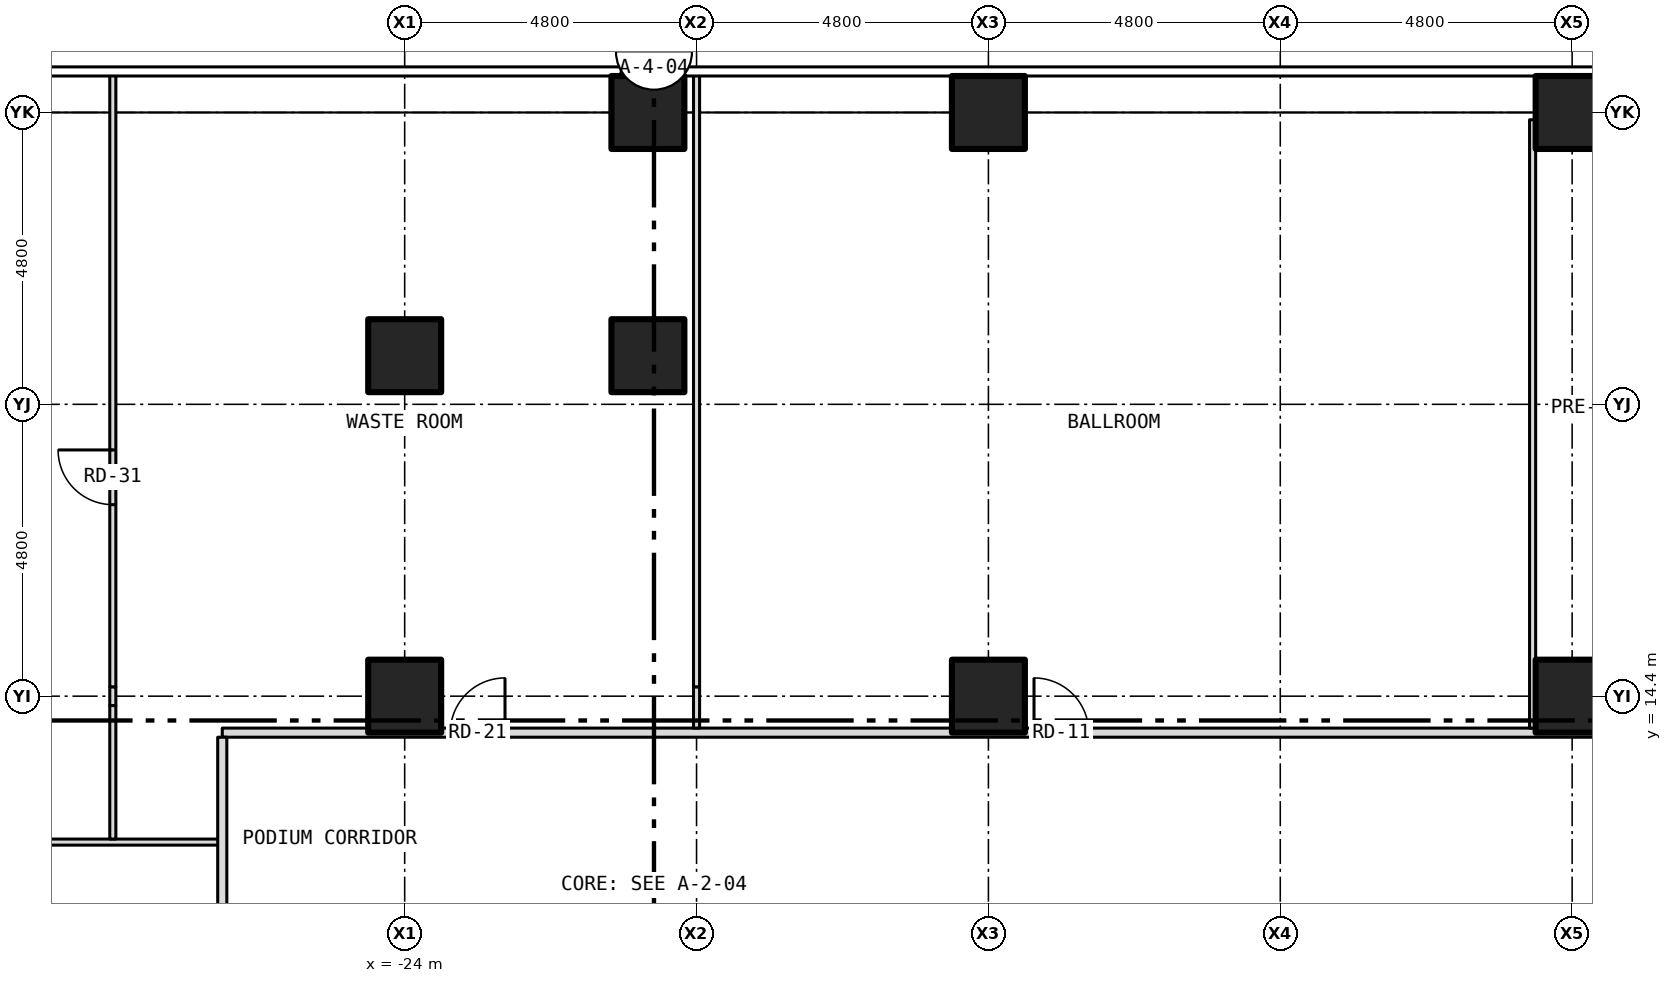
"""IFC4 building model, lengths in metres.
Left out: names, types, materials, properties, quantities, classifications, styles, units other than length and angle.
Written with IfcOpenShell. Run it as: python <this file> out.ifc"""

import sys

from ifc_helpers import new_model, si_unit, direction, frame, frame_2d, origin, origin_2d, place, context, subcontext, project, spatial, rectangle, hollow_rectangle, extrude, element, fill, save


model = new_model("IFC4")
c1 = context("Model", 3, precision=1e-05, world=origin(), true_north=direction((0.0, 1.0)))
c2 = subcontext(c1, "Body", "Model", "MODEL_VIEW")
j1 = project(units=[si_unit("LENGTHUNIT", "METRE"), si_unit("PLANEANGLEUNIT", "RADIAN")], contexts=[c1])
p1 = place(None, origin())
s1 = spatial("IfcSite", under=j1, at=p1, CompositionType="ELEMENT")
p2 = place(p1, origin())
s2 = spatial("IfcBuilding", under=s1, at=p2, CompositionType="ELEMENT")
p3 = place(p2, frame((0.0, 0.0, 7.5)))
s3 = spatial("IfcBuildingStorey", under=s2, at=p3, CompositionType="ELEMENT", Elevation=7.5)
for number, where, z_axis, x_axis in (
    (1, (-20.0, 24.0, -0.25), (0.0, 0.0, 1.0), (1.0, 0.0, 0.0)),
    (2, (-14.4, 24.0, -0.25), (0.0, 0.0, 1.0), (1.0, 0.0, 0.0)),
    (3, (-4.8, 24.0, -0.25), (0.0, 0.0, 1.0), (1.0, 0.0, 0.0)),
    (4, (-24.0, 14.4, -0.25), (0.0, 0.0, 1.0), (1.0, 0.0, 0.0)),
    (5, (-24.0, 20.0, -0.25), (0.0, 0.0, 1.0), (1.0, 0.0, 0.0)),
    (6, (-20.0, 20.0, -0.25), (0.0, 0.0, 1.0), (1.0, 0.0, 0.0)),
    (7, (-14.4, 14.4, -0.25), (0.0, 0.0, 1.0), (1.0, 0.0, 0.0)),
    (8, (-4.8, 14.4, -0.25), (0.0, 0.0, 1.0), (1.0, 0.0, 0.0)),
):
    element("IfcColumn", number, at=place(p3, frame(where, z_axis=z_axis, x_axis=x_axis)), inside=s3, PredefinedType="COLUMN", context=c2, shape_type="SweptSolid", body=[
        extrude(hollow_rectangle(XDim=1.2, YDim=1.2, WallThickness=0.07, at=origin_2d()), origin(), (0.0, 0.0, 1.0), 8.05),
    ])
p4 = place(p3, frame((-38.28, 12.0, 0.0), z_axis=(0.0, 0.0, 1.0), x_axis=(1.0, 0.0, 0.0)))
e9 = element("IfcWall", 9, at=p4, inside=s3, PredefinedType="PARTITIONING", context=c2, shape_type="SweptSolid", body=[
    extrude(rectangle(XDim=11.28, YDim=0.1, at=frame_2d((5.64, 0.0))), origin(), (0.0, 0.0, 1.0), 7.8),
])
p5 = place(p3, frame((-27.0, 13.8, 0.0), z_axis=(0.0, 0.0, 1.0), x_axis=(1.0, 0.0, 0.0)))
e10 = element("IfcWall", 10, at=p5, inside=s3, PredefinedType="PARTITIONING", context=c2, shape_type="SweptSolid", body=[
    extrude(rectangle(XDim=54.0, YDim=0.15, at=frame_2d((27.0, 0.0))), origin(), (0.0, 0.0, 1.0), 7.8),
])
p6 = place(p5, frame((13.35, 0.0, 0.0)))
e11 = element("IfcOpeningElement", 11, at=p6, cuts=e10, PredefinedType="OPENING", context=c2, shape_type="SweptSolid", body=[
    extrude(rectangle(XDim=0.9, YDim=2.1, at=frame_2d((0.45, 1.05))), frame((0.0, 0.087, 0.0), z_axis=(0.0, -1.0, 0.0), x_axis=(1.0, 0.0, 0.0)), (0.0, 0.0, 1.0), 0.174),
])
p7 = place(p5, frame((22.846, 0.0, 0.0)))
e12 = element("IfcOpeningElement", 12, at=p7, cuts=e10, PredefinedType="OPENING", context=c2, shape_type="SweptSolid", body=[
    extrude(rectangle(XDim=0.9, YDim=2.1, at=frame_2d((0.45, 1.05))), frame((0.0, 0.087, 0.0), z_axis=(0.0, -1.0, 0.0), x_axis=(1.0, 0.0, 0.0)), (0.0, 0.0, 1.0), 0.174),
])
p8 = place(p5, frame((28.756, 0.0, 0.0)))
e13 = element("IfcOpeningElement", 13, at=p8, cuts=e10, PredefinedType="OPENING", context=c2, shape_type="SweptSolid", body=[
    extrude(rectangle(XDim=0.9, YDim=2.1, at=frame_2d((0.45, 1.05))), frame((0.0, 0.087, 0.0), z_axis=(0.0, -1.0, 0.0), x_axis=(1.0, 0.0, 0.0)), (0.0, 0.0, 1.0), 0.174),
])
p9 = place(p5, frame((33.556, 0.0, 0.0)))
e14 = element("IfcOpeningElement", 14, at=p9, cuts=e10, PredefinedType="OPENING", context=c2, shape_type="SweptSolid", body=[
    extrude(rectangle(XDim=0.9, YDim=2.1, at=frame_2d((0.45, 1.05))), frame((0.0, 0.087, 0.0), z_axis=(0.0, -1.0, 0.0), x_axis=(1.0, 0.0, 0.0)), (0.0, 0.0, 1.0), 0.174),
])
p10 = place(p5, frame((42.768, 0.0, 0.0)))
e15 = element("IfcOpeningElement", 15, at=p10, cuts=e10, PredefinedType="OPENING", context=c2, shape_type="SweptSolid", body=[
    extrude(rectangle(XDim=0.9, YDim=2.1, at=frame_2d((0.45, 1.05))), frame((0.0, 0.087, 0.0), z_axis=(0.0, -1.0, 0.0), x_axis=(1.0, 0.0, 0.0)), (0.0, 0.0, 1.0), 0.174),
])
p11 = place(p5, frame((3.75, 0.0, 0.0)))
e16 = element("IfcOpeningElement", 16, at=p11, cuts=e10, PredefinedType="OPENING", context=c2, shape_type="SweptSolid", body=[
    extrude(rectangle(XDim=0.9, YDim=2.1, at=frame_2d((0.45, 1.05))), frame((0.0, 0.087, 0.0), z_axis=(0.0, -1.0, 0.0), x_axis=(1.0, 0.0, 0.0)), (0.0, 0.0, 1.0), 0.174),
])
p12 = place(p5, frame((49.35, 0.0, 0.0)))
e17 = element("IfcOpeningElement", 17, at=p12, cuts=e10, PredefinedType="OPENING", context=c2, shape_type="SweptSolid", body=[
    extrude(rectangle(XDim=0.9, YDim=2.1, at=frame_2d((0.45, 1.05))), frame((0.0, 0.087, 0.0), z_axis=(0.0, -1.0, 0.0), x_axis=(1.0, 0.0, 0.0)), (0.0, 0.0, 1.0), 0.174),
])
p13 = place(p5, frame((25.283, 0.0, 0.0)))
e18 = element("IfcOpeningElement", 18, at=p13, cuts=e10, PredefinedType="OPENING", context=c2, shape_type="SweptSolid", body=[
    extrude(rectangle(XDim=0.9, YDim=2.1, at=frame_2d((0.45, 1.05))), frame((0.0, 0.087, 0.0), z_axis=(0.0, -1.0, 0.0), x_axis=(1.0, 0.0, 0.0)), (0.0, 0.0, 1.0), 0.174),
])
p14 = place(p3, frame((-28.8, 12.05, 0.0), z_axis=(0.0, 0.0, 1.0), x_axis=(0.0, 1.0, 0.0)))
e19 = element("IfcWall", 19, at=p14, inside=s3, PredefinedType="PARTITIONING", context=c2, shape_type="SweptSolid", body=[
    extrude(rectangle(XDim=2.196, YDim=0.1, at=frame_2d((1.098, 0.0))), origin(), (0.0, 0.0, 1.0), 7.183),
])
p15 = place(p3, frame((-28.8, 14.246, 0.0), z_axis=(0.0, 0.0, 1.0), x_axis=(0.0, 1.0, 0.0)))
e20 = element("IfcWall", 20, at=p15, inside=s3, PredefinedType="PARTITIONING", context=c2, shape_type="SweptSolid", body=[
    extrude(rectangle(XDim=0.308, YDim=0.1, at=frame_2d((0.154, 0.0))), origin(), (0.0, 0.0, 1.0), 7.8),
])
p16 = place(p3, frame((-28.8, 14.554, 0.0), z_axis=(0.0, 0.0, 1.0), x_axis=(0.0, 1.0, 0.0)))
e21 = element("IfcWall", 21, at=p16, inside=s3, PredefinedType="PARTITIONING", context=c2, shape_type="SweptSolid", body=[
    extrude(rectangle(XDim=10.076, YDim=0.1, at=frame_2d((5.038, 0.0))), origin(), (0.0, 0.0, 1.0), 7.183),
])
p17 = place(p16, frame((2.996, 0.0, 0.0)))
e22 = element("IfcOpeningElement", 22, at=p17, cuts=e21, PredefinedType="OPENING", context=c2, shape_type="SweptSolid", body=[
    extrude(rectangle(XDim=0.9, YDim=2.1, at=frame_2d((0.45, 1.05))), frame((0.0, 0.062, 0.0), z_axis=(0.0, -1.0, 0.0), x_axis=(1.0, 0.0, 0.0)), (0.0, 0.0, 1.0), 0.124),
])
p18 = place(p3, frame((-27.0, -13.725, 0.0), z_axis=(0.0, 0.0, 1.0), x_axis=(0.0, 1.0, 0.0)))
e23 = element("IfcWall", 23, at=p18, inside=s3, PredefinedType="PARTITIONING", context=c2, shape_type="SweptSolid", body=[
    extrude(rectangle(XDim=27.45, YDim=0.15, at=frame_2d((13.725, 0.0))), origin(), (0.0, 0.0, 1.0), 7.8),
])
p19 = place(p18, frame((7.275, 0.0, 0.0)))
e24 = element("IfcOpeningElement", 24, at=p19, cuts=e23, PredefinedType="OPENING", context=c2, shape_type="SweptSolid", body=[
    extrude(rectangle(XDim=0.9, YDim=2.1, at=frame_2d((0.45, 1.05))), frame((0.0, 0.087, 0.0), z_axis=(0.0, -1.0, 0.0), x_axis=(1.0, 0.0, 0.0)), (0.0, 0.0, 1.0), 0.174),
])
p20 = place(p18, frame((19.275, 0.0, 0.0)))
e25 = element("IfcOpeningElement", 25, at=p20, cuts=e23, PredefinedType="OPENING", context=c2, shape_type="SweptSolid", body=[
    extrude(rectangle(XDim=0.9, YDim=2.1, at=frame_2d((0.45, 1.05))), frame((0.0, 0.087, 0.0), z_axis=(0.0, -1.0, 0.0), x_axis=(1.0, 0.0, 0.0)), (0.0, 0.0, 1.0), 0.174),
])
p21 = place(p3, frame((-19.2, 13.875, 0.0), z_axis=(0.0, 0.0, 1.0), x_axis=(0.0, 1.0, 0.0)))
e26 = element("IfcWall", 26, at=p21, inside=s3, PredefinedType="PARTITIONING", context=c2, shape_type="SweptSolid", body=[
    extrude(rectangle(XDim=0.679, YDim=0.1, at=frame_2d((0.339, 0.0))), origin(), (0.0, 0.0, 1.0), 7.8),
])
p22 = place(p3, frame((-19.2, 14.554, 0.0), z_axis=(0.0, 0.0, 1.0), x_axis=(0.0, 1.0, 0.0)))
e27 = element("IfcWall", 27, at=p22, inside=s3, PredefinedType="PARTITIONING", context=c2, shape_type="SweptSolid", body=[
    extrude(rectangle(XDim=10.076, YDim=0.1, at=frame_2d((5.038, 0.0))), origin(), (0.0, 0.0, 1.0), 7.183),
])
p23 = place(p3, frame((-5.45, 13.875, 0.0), z_axis=(0.0, 0.0, 1.0), x_axis=(0.0, 1.0, 0.0)))
e28 = element("IfcWall", 28, at=p23, inside=s3, PredefinedType="PARTITIONING", context=c2, shape_type="SweptSolid", body=[
    extrude(rectangle(XDim=10.005, YDim=0.1, at=frame_2d((5.002, 0.0))), origin(), (0.0, 0.0, 1.0), 7.8),
])
p24 = place(p6, origin())
e29 = element("IfcDoor", 29, at=p24, inside=s3, OperationType="SINGLE_SWING_LEFT", PredefinedType="DOOR", context=c2, shape_type="SweptSolid", body=[
    extrude(rectangle(XDim=0.9, YDim=2.1, at=frame_2d((0.45, 1.05))), frame((0.0, 0.025, 0.0), z_axis=(0.0, -1.0, 0.0), x_axis=(1.0, 0.0, 0.0)), (0.0, 0.0, 1.0), 0.05),
])
fill(e11, e29)
p25 = place(p11, origin())
e30 = element("IfcDoor", 30, at=p25, inside=s3, OperationType="SINGLE_SWING_RIGHT", PredefinedType="DOOR", context=c2, shape_type="SweptSolid", body=[
    extrude(rectangle(XDim=0.9, YDim=2.1, at=frame_2d((0.45, 1.05))), frame((0.0, 0.025, 0.0), z_axis=(0.0, -1.0, 0.0), x_axis=(1.0, 0.0, 0.0)), (0.0, 0.0, 1.0), 0.05),
])
fill(e16, e30)
p26 = place(p17, origin())
e31 = element("IfcDoor", 31, at=p26, inside=s3, OperationType="SINGLE_SWING_RIGHT", PredefinedType="DOOR", context=c2, shape_type="SweptSolid", body=[
    extrude(rectangle(XDim=0.9, YDim=2.1, at=frame_2d((0.45, 1.05))), frame((0.0, 0.025, 0.0), z_axis=(0.0, -1.0, 0.0), x_axis=(1.0, 0.0, 0.0)), (0.0, 0.0, 1.0), 0.05),
])
fill(e22, e31)
save(model, sys.argv[1])
